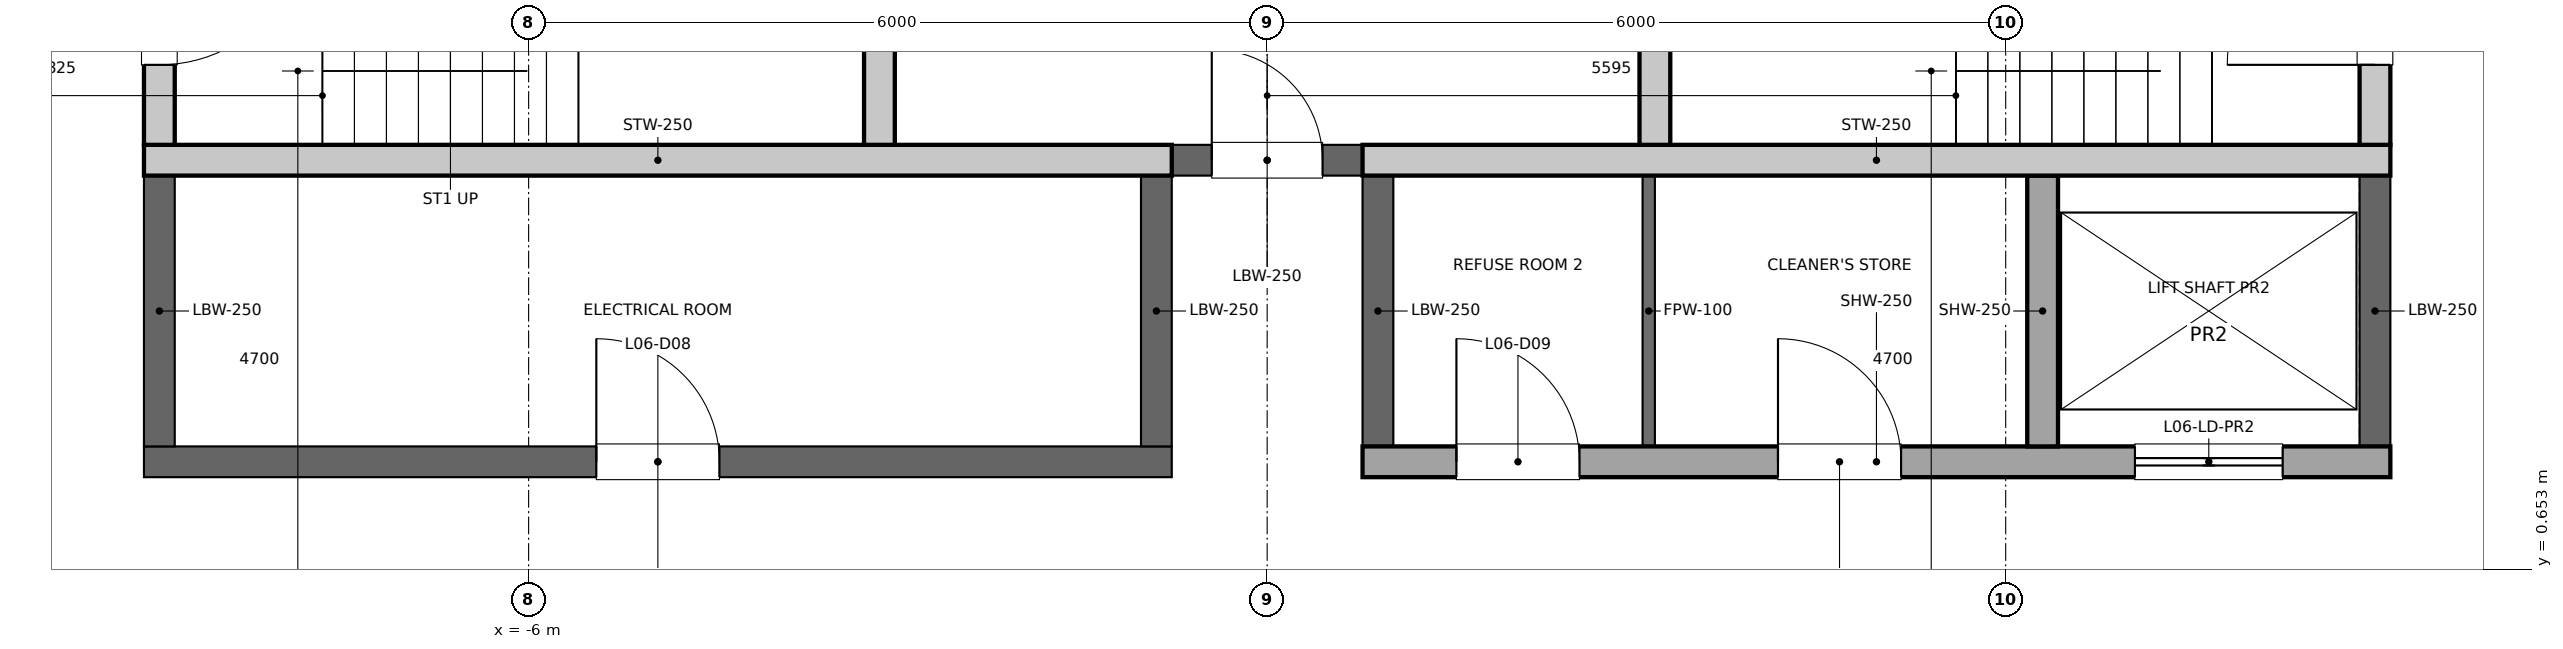
"""IFC4 building model, lengths in metres.
Left out: names, types, materials, properties, quantities, classifications, styles, units other than length and angle.
Written with IfcOpenShell. Run it as: python <this file> out.ifc"""

import sys

from ifc_helpers import new_model, si_unit, direction, frame, frame_2d, origin, place, context, subcontext, project, spatial, rectangle, extrude, element, fill, save


model = new_model("IFC4")
c1 = context("Model", 3, precision=1e-05, world=origin(), true_north=direction((0.0, 1.0)))
c2 = subcontext(c1, "Body", "Model", "MODEL_VIEW")
j1 = project(units=[si_unit("LENGTHUNIT", "METRE"), si_unit("PLANEANGLEUNIT", "RADIAN")], contexts=[c1])
p1 = place(None, origin())
s1 = spatial("IfcSite", under=j1, at=p1, CompositionType="ELEMENT")
p2 = place(p1, origin())
s2 = spatial("IfcBuilding", under=s1, at=p2, CompositionType="ELEMENT")
p3 = place(p2, frame((0.0, 0.0, 44.0)))
s3 = spatial("IfcBuildingStorey", under=s2, at=p3, CompositionType="ELEMENT", Elevation=44.0)
p4 = place(p3, frame((-9.0, 4.1, 0.0), z_axis=(0.0, 0.0, 1.0), x_axis=(0.0, 1.0, 0.0)))
e1 = element("IfcWall", 1, at=p4, inside=s3, PredefinedType="SOLIDWALL", context=c2, shape_type="SweptSolid", body=[
    extrude(rectangle(XDim=2.5, YDim=0.25, at=frame_2d((1.25, 0.0))), origin(), (0.0, 0.0, 1.0), 6.25),
])
p5 = place(p4, frame((0.65, 0.0, 0.0)))
e2 = element("IfcOpeningElement", 2, at=p5, cuts=e1, PredefinedType="OPENING", context=c2, shape_type="SweptSolid", body=[
    extrude(rectangle(XDim=1.2, YDim=2.1, at=frame_2d((0.6, 1.05))), frame((0.0, 0.125, 0.0), z_axis=(0.0, -1.0, 0.0), x_axis=(1.0, 0.0, 0.0)), (0.0, 0.0, 1.0), 0.25),
])
p6 = place(p3, frame((9.0, 4.1, 0.0), z_axis=(0.0, 0.0, 1.0), x_axis=(0.0, 1.0, 0.0)))
e3 = element("IfcWall", 3, at=p6, inside=s3, PredefinedType="SOLIDWALL", context=c2, shape_type="SweptSolid", body=[
    extrude(rectangle(XDim=2.5, YDim=0.25, at=frame_2d((1.25, 0.0))), origin(), (0.0, 0.0, 1.0), 6.25),
])
p7 = place(p6, frame((0.65, 0.0, 0.0)))
e4 = element("IfcOpeningElement", 4, at=p7, cuts=e3, PredefinedType="OPENING", context=c2, shape_type="SweptSolid", body=[
    extrude(rectangle(XDim=1.2, YDim=2.1, at=frame_2d((0.6, 1.05))), frame((0.0, 0.125, 0.0), z_axis=(0.0, -1.0, 0.0), x_axis=(1.0, 0.0, 0.0)), (0.0, 0.0, 1.0), 0.25),
])
for number, where, z_axis, x_axis in (
    (5, (-3.15, 4.1, 0.0), (0.0, 0.0, 1.0), (0.0, 1.0, 0.0)),
    (6, (3.15, 4.1, 0.0), (0.0, 0.0, 1.0), (0.0, 1.0, 0.0)),
):
    element("IfcWall", number, at=place(p3, frame(where, z_axis=z_axis, x_axis=x_axis)), inside=s3, PredefinedType="SOLIDWALL", context=c2, shape_type="SweptSolid", body=[
        extrude(rectangle(XDim=2.5, YDim=0.25, at=frame_2d((1.25, 0.0))), origin(), (0.0, 0.0, 1.0), 6.25),
    ])
p8 = place(p3, frame((-0.775, 3.975, 0.0), z_axis=(0.0, 0.0, 1.0), x_axis=(1.0, 0.0, 0.0)))
e7 = element("IfcWall", 7, at=p8, inside=s3, PredefinedType="PARTITIONING", context=c2, shape_type="SweptSolid", body=[
    extrude(rectangle(XDim=1.55, YDim=0.25, at=frame_2d((0.775, 0.0))), origin(), (0.0, 0.0, 1.0), 6.25),
])
p9 = place(p8, frame((0.325, 0.0, 0.0)))
e8 = element("IfcOpeningElement", 8, at=p9, cuts=e7, PredefinedType="OPENING", context=c2, shape_type="SweptSolid", body=[
    extrude(rectangle(XDim=0.9, YDim=2.1, at=frame_2d((0.45, 1.05))), frame((0.0, 0.125, 0.0), z_axis=(0.0, -1.0, 0.0), x_axis=(1.0, 0.0, 0.0)), (0.0, 0.0, 1.0), 0.25),
])
p10 = place(p3, frame((-9.125, 1.525, 0.0), z_axis=(0.0, 0.0, 1.0), x_axis=(1.0, 0.0, 0.0)))
e9 = element("IfcWall", 9, at=p10, inside=s3, PredefinedType="PARTITIONING", context=c2, shape_type="SweptSolid", body=[
    extrude(rectangle(XDim=8.35, YDim=0.25, at=frame_2d((4.175, 0.0))), origin(), (0.0, 0.0, 1.0), 6.25),
])
p11 = place(p10, frame((3.675, 0.0, 0.0)))
e10 = element("IfcOpeningElement", 10, at=p11, cuts=e9, PredefinedType="OPENING", context=c2, shape_type="SweptSolid", body=[
    extrude(rectangle(XDim=1.0, YDim=2.1, at=frame_2d((0.5, 1.05))), frame((0.0, 0.125, 0.0), z_axis=(0.0, -1.0, 0.0), x_axis=(1.0, 0.0, 0.0)), (0.0, 0.0, 1.0), 0.25),
])
p12 = place(p3, frame((0.775, 1.525, 0.0), z_axis=(0.0, 0.0, 1.0), x_axis=(1.0, 0.0, 0.0)))
e11 = element("IfcWall", 11, at=p12, inside=s3, PredefinedType="SOLIDWALL", context=c2, shape_type="SweptSolid", body=[
    extrude(rectangle(XDim=8.35, YDim=0.25, at=frame_2d((4.175, 0.0))), origin(), (0.0, 0.0, 1.0), 6.25),
])
p13 = place(p12, frame((6.275, 0.0, 0.0)))
e12 = element("IfcOpeningElement", 12, at=p13, cuts=e11, PredefinedType="OPENING", context=c2, shape_type="SweptSolid", body=[
    extrude(rectangle(XDim=1.2, YDim=2.1, at=frame_2d((0.6, 1.05))), frame((0.0, 0.125, 0.0), z_axis=(0.0, -1.0, 0.0), x_axis=(1.0, 0.0, 0.0)), (0.0, 0.0, 1.0), 0.25),
])
p14 = place(p12, frame((0.762, 0.0, 0.0)))
e13 = element("IfcOpeningElement", 13, at=p14, cuts=e11, PredefinedType="OPENING", context=c2, shape_type="SweptSolid", body=[
    extrude(rectangle(XDim=1.0, YDim=2.1, at=frame_2d((0.5, 1.05))), frame((0.0, 0.125, 0.0), z_axis=(0.0, -1.0, 0.0), x_axis=(1.0, 0.0, 0.0)), (0.0, 0.0, 1.0), 0.25),
])
p15 = place(p12, frame((3.375, 0.0, 0.0)))
e14 = element("IfcOpeningElement", 14, at=p15, cuts=e11, PredefinedType="OPENING", context=c2, shape_type="SweptSolid", body=[
    extrude(rectangle(XDim=1.0, YDim=2.1, at=frame_2d((0.5, 1.05))), frame((0.0, 0.125, 0.0), z_axis=(0.0, -1.0, 0.0), x_axis=(1.0, 0.0, 0.0)), (0.0, 0.0, 1.0), 0.25),
])
p16 = place(p3, frame((6.3, 1.65, 0.0), z_axis=(0.0, 0.0, 1.0), x_axis=(0.0, 1.0, 0.0)))
e15 = element("IfcWall", 15, at=p16, inside=s3, PredefinedType="SOLIDWALL", context=c2, shape_type="SweptSolid", body=[
    extrude(rectangle(XDim=2.2, YDim=0.25, at=frame_2d((1.1, 0.0))), origin(), (0.0, 0.0, 1.0), 6.25),
])
for number, where, z_axis, x_axis in (
    (16, (-9.125, 3.975, 0.0), (0.0, 0.0, 1.0), (1.0, 0.0, 0.0)),
    (17, (0.775, 3.975, 0.0), (0.0, 0.0, 1.0), (1.0, 0.0, 0.0)),
):
    element("IfcWall", number, at=place(p3, frame(where, z_axis=z_axis, x_axis=x_axis)), inside=s3, PredefinedType="SOLIDWALL", context=c2, shape_type="SweptSolid", body=[
        extrude(rectangle(XDim=8.35, YDim=0.25, at=frame_2d((4.175, 0.0))), origin(), (0.0, 0.0, 1.0), 6.25),
    ])
for number, where, z_axis, x_axis in (
    (18, (-9.0, 1.65, 0.0), (0.0, 0.0, 1.0), (0.0, 1.0, 0.0)),
    (19, (-0.9, 1.65, 0.0), (0.0, 0.0, 1.0), (0.0, 1.0, 0.0)),
    (20, (9.0, 1.65, 0.0), (0.0, 0.0, 1.0), (0.0, 1.0, 0.0)),
    (21, (0.9, 1.65, 0.0), (0.0, 0.0, 1.0), (0.0, 1.0, 0.0)),
):
    element("IfcWall", number, at=place(p3, frame(where, z_axis=z_axis, x_axis=x_axis)), inside=s3, PredefinedType="PARTITIONING", context=c2, shape_type="SweptSolid", body=[
        extrude(rectangle(XDim=2.2, YDim=0.25, at=frame_2d((1.1, 0.0))), origin(), (0.0, 0.0, 1.0), 6.25),
    ])
p17 = place(p3, frame((3.1, 1.65, 0.0), z_axis=(0.0, 0.0, 1.0), x_axis=(0.0, 1.0, 0.0)))
e22 = element("IfcWall", 22, at=p17, inside=s3, PredefinedType="PARTITIONING", context=c2, shape_type="SweptSolid", body=[
    extrude(rectangle(XDim=2.2, YDim=0.1, at=frame_2d((1.1, 0.0))), origin(), (0.0, 0.0, 1.0), 6.25),
])
p18 = place(p13, origin())
e23 = element("IfcDoor", 23, at=p18, inside=s3, OperationType="DOUBLE_DOOR_SLIDING", PredefinedType="DOOR", context=c2, shape_type="SweptSolid", body=[
    extrude(rectangle(XDim=1.2, YDim=2.1, at=frame_2d((0.6, 1.05))), frame((0.0, 0.025, 0.0), z_axis=(0.0, -1.0, 0.0), x_axis=(1.0, 0.0, 0.0)), (0.0, 0.0, 1.0), 0.05),
])
fill(e12, e23)
p19 = place(p5, origin())
e24 = element("IfcDoor", 24, at=p19, inside=s3, OperationType="SINGLE_SWING_RIGHT", PredefinedType="DOOR", context=c2, shape_type="SweptSolid", body=[
    extrude(rectangle(XDim=1.2, YDim=2.1, at=frame_2d((0.6, 1.05))), frame((0.0, 0.025, 0.0), z_axis=(0.0, -1.0, 0.0), x_axis=(1.0, 0.0, 0.0)), (0.0, 0.0, 1.0), 0.05),
])
fill(e2, e24)
p20 = place(p7, origin())
e25 = element("IfcDoor", 25, at=p20, inside=s3, OperationType="SINGLE_SWING_LEFT", PredefinedType="DOOR", context=c2, shape_type="SweptSolid", body=[
    extrude(rectangle(XDim=1.2, YDim=2.1, at=frame_2d((0.6, 1.05))), frame((0.0, 0.025, 0.0), z_axis=(0.0, -1.0, 0.0), x_axis=(1.0, 0.0, 0.0)), (0.0, 0.0, 1.0), 0.05),
])
fill(e4, e25)
p21 = place(p9, origin())
e26 = element("IfcDoor", 26, at=p21, inside=s3, OperationType="SINGLE_SWING_LEFT", PredefinedType="DOOR", context=c2, shape_type="SweptSolid", body=[
    extrude(rectangle(XDim=0.9, YDim=2.1, at=frame_2d((0.45, 1.05))), frame((0.0, 0.025, 0.0), z_axis=(0.0, -1.0, 0.0), x_axis=(1.0, 0.0, 0.0)), (0.0, 0.0, 1.0), 0.05),
])
fill(e8, e26)
p22 = place(p11, origin())
e27 = element("IfcDoor", 27, at=p22, inside=s3, OperationType="SINGLE_SWING_LEFT", PredefinedType="DOOR", context=c2, shape_type="SweptSolid", body=[
    extrude(rectangle(XDim=1.0, YDim=2.1, at=frame_2d((0.5, 1.05))), frame((0.0, 0.025, 0.0), z_axis=(0.0, -1.0, 0.0), x_axis=(1.0, 0.0, 0.0)), (0.0, 0.0, 1.0), 0.05),
])
fill(e10, e27)
p23 = place(p14, origin())
e28 = element("IfcDoor", 28, at=p23, inside=s3, OperationType="SINGLE_SWING_LEFT", PredefinedType="DOOR", context=c2, shape_type="SweptSolid", body=[
    extrude(rectangle(XDim=1.0, YDim=2.1, at=frame_2d((0.5, 1.05))), frame((0.0, 0.025, 0.0), z_axis=(0.0, -1.0, 0.0), x_axis=(1.0, 0.0, 0.0)), (0.0, 0.0, 1.0), 0.05),
])
fill(e13, e28)
p24 = place(p15, origin())
e29 = element("IfcDoor", 29, at=p24, inside=s3, OperationType="SINGLE_SWING_LEFT", PredefinedType="DOOR", context=c2, shape_type="SweptSolid", body=[
    extrude(rectangle(XDim=1.0, YDim=2.1, at=frame_2d((0.5, 1.05))), frame((0.0, 0.025, 0.0), z_axis=(0.0, -1.0, 0.0), x_axis=(1.0, 0.0, 0.0)), (0.0, 0.0, 1.0), 0.05),
])
fill(e14, e29)
save(model, sys.argv[1])
